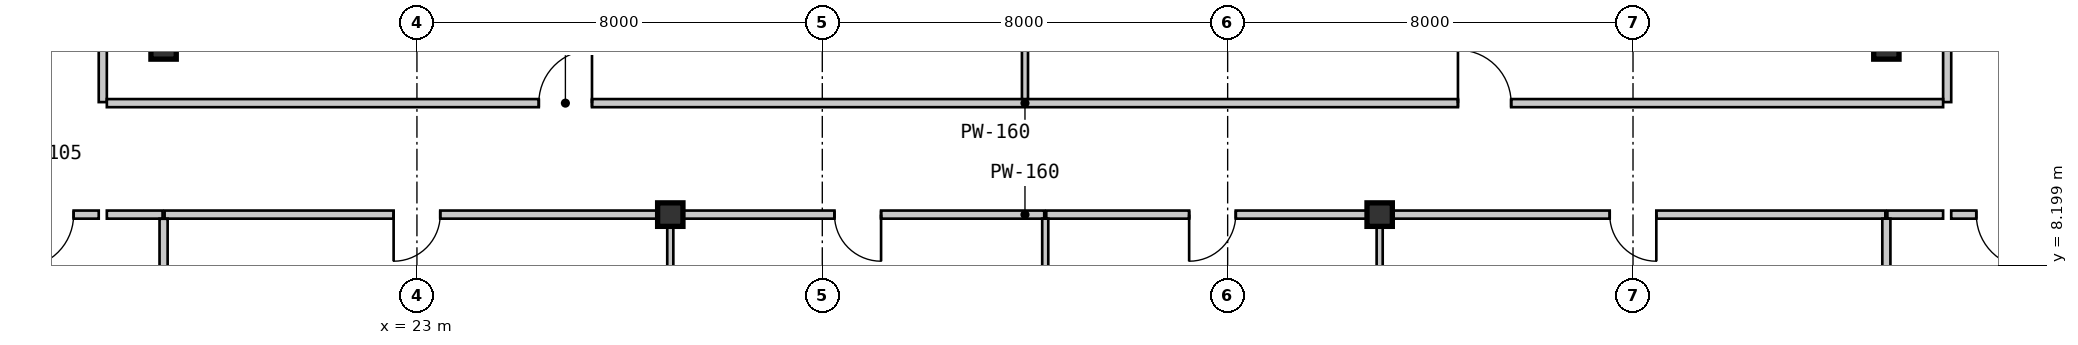
"""IFC4 building model, lengths in metres.
Left out: names, types, materials, properties, quantities, classifications, styles, units other than length and angle.
Written with IfcOpenShell. Run it as: python <this file> out.ifc"""

import sys

from ifc_helpers import new_model, si_unit, direction, frame, frame_2d, origin, origin_2d, place, context, subcontext, project, spatial, rectangle, i_section, extrude, source, transform, mapped, element, fill, save


model = new_model("IFC4")
c1 = context("Model", 3, precision=1e-05, world=origin(), true_north=direction((0.0, 1.0)))
c2 = subcontext(c1, "Body", "Model", "MODEL_VIEW")
j1 = project(units=[si_unit("LENGTHUNIT", "METRE"), si_unit("PLANEANGLEUNIT", "RADIAN")], contexts=[c1])
p1 = place(None, origin())
s1 = spatial("IfcSite", under=j1, at=p1, CompositionType="ELEMENT")
p2 = place(p1, origin())
s2 = spatial("IfcBuilding", under=s1, at=p2, CompositionType="ELEMENT")
p3 = place(p2, frame((0.0, 0.0, 74.55)))
s3 = spatial("IfcBuildingStorey", under=s2, at=p3, CompositionType="ELEMENT", Elevation=74.55)
m1 = source(origin(), c2, "Body", "SweptSolid", [
    extrude(i_section(OverallWidth=0.5, OverallDepth=0.464, WebThickness=0.022, FlangeThickness=0.034, at=origin_2d()), origin(), (0.0, 0.0, 1.0), 3.15),
])
for number, where, z_axis, x_axis in (
    (1, (28.0, 9.2, 0.0), (0.0, 0.0, 1.0), (1.0, 0.0, 0.0)),
    (2, (42.0, 9.2, 0.0), (0.0, 0.0, 1.0), (1.0, 0.0, 0.0)),
    (3, (18.0, 12.5, 0.0), (0.0, 0.0, 1.0), (1.0, 0.0, 0.0)),
    (4, (52.0, 12.5, 0.0), (0.0, 0.0, 1.0), (1.0, 0.0, 0.0)),
):
    element("IfcColumn", number, at=place(p3, frame(where, z_axis=z_axis, x_axis=x_axis)), inside=s3, PredefinedType="COLUMN", context=c2, shape_type="MappedRepresentation", body=[
        mapped(m1, transform((0.0, 0.0, 0.0), scale=1.0)),
    ])
m2 = source(origin(), c2, "Body", "SweptSolid", [
    extrude(rectangle(XDim=5.16, YDim=0.16, at=frame_2d((2.58, 0.0))), origin(), (0.0, 0.0, 1.0), 2.93),
])
for number, where, z_axis, x_axis in (
    (5, (16.8, 16.58, 0.0), (0.0, 0.0, 1.0), (0.0, -1.0, 0.0)),
    (6, (53.2, 11.42, 0.0), (0.0, 0.0, 1.0), (0.0, 1.0, 0.0)),
):
    element("IfcWall", number, at=place(p3, frame(where, z_axis=z_axis, x_axis=x_axis)), inside=s3, PredefinedType="PARTITIONING", context=c2, shape_type="MappedRepresentation", body=[
        mapped(m2, transform((0.0, 0.0, 0.0), scale=1.0)),
    ])
m3 = source(origin(), c2, "Body", "SweptSolid", [
    extrude(rectangle(XDim=2.04, YDim=0.16, at=frame_2d((1.02, 0.0))), origin(), (0.0, 0.0, 1.0), 2.93),
])
p4 = place(p3, frame((16.72, 9.2, 0.0), z_axis=(0.0, 0.0, 1.0), x_axis=(-1.0, 0.0, 0.0)))
e7 = element("IfcWall", 7, at=p4, inside=s3, PredefinedType="PARTITIONING", context=c2, shape_type="MappedRepresentation", body=[
    mapped(m3, transform((0.0, 0.0, 0.0), scale=1.0)),
])
m4 = source(origin(), c2, "Body", "SweptSolid", [
    extrude(rectangle(XDim=1.05, YDim=2.1, at=frame_2d((0.525, 1.05))), frame((0.0, 0.09, 0.0), z_axis=(0.0, -1.0, 0.0), x_axis=(1.0, 0.0, 0.0)), (0.0, 0.0, 1.0), 0.18),
])
p5 = place(p4, frame((0.495, 0.0, 0.0)))
e8 = element("IfcOpeningElement", 8, at=p5, cuts=e7, PredefinedType="OPENING", context=c2, shape_type="MappedRepresentation", body=[
    mapped(m4, transform((0.0, 0.0, 0.0), scale=1.0)),
])
p6 = place(p3, frame((55.32, 9.2, 0.0), z_axis=(0.0, 0.0, 1.0), x_axis=(-1.0, 0.0, 0.0)))
e9 = element("IfcWall", 9, at=p6, inside=s3, PredefinedType="PARTITIONING", context=c2, shape_type="MappedRepresentation", body=[
    mapped(m3, transform((0.0, 0.0, 0.0), scale=1.0)),
])
p7 = place(p6, frame((0.495, 0.0, 0.0)))
e10 = element("IfcOpeningElement", 10, at=p7, cuts=e9, PredefinedType="OPENING", context=c2, shape_type="MappedRepresentation", body=[
    mapped(m4, transform((0.0, 0.0, 0.0), scale=1.0)),
])
m5 = source(origin(), c2, "Body", "SweptSolid", [
    extrude(rectangle(XDim=18.1, YDim=0.16, at=frame_2d((9.05, 0.0))), origin(), (0.0, 0.0, 1.0), 2.93),
])
p8 = place(p3, frame((16.88, 11.4, 0.0), z_axis=(0.0, 0.0, 1.0), x_axis=(1.0, 0.0, 0.0)))
e11 = element("IfcWall", 11, at=p8, inside=s3, PredefinedType="PARTITIONING", context=c2, shape_type="MappedRepresentation", body=[
    mapped(m5, transform((0.0, 0.0, 0.0), scale=1.0)),
])
p9 = place(p8, frame((8.525, 0.0, 0.0)))
e12 = element("IfcOpeningElement", 12, at=p9, cuts=e11, PredefinedType="OPENING", context=c2, shape_type="MappedRepresentation", body=[
    mapped(m4, transform((0.0, 0.0, 0.0), scale=1.0)),
])
p10 = place(p3, frame((35.02, 11.4, 0.0), z_axis=(0.0, 0.0, 1.0), x_axis=(1.0, 0.0, 0.0)))
e13 = element("IfcWall", 13, at=p10, inside=s3, PredefinedType="PARTITIONING", context=c2, shape_type="MappedRepresentation", body=[
    mapped(m5, transform((0.0, 0.0, 0.0), scale=1.0)),
])
p11 = place(p10, frame((8.525, 0.0, 0.0)))
e14 = element("IfcOpeningElement", 14, at=p11, cuts=e13, PredefinedType="OPENING", context=c2, shape_type="MappedRepresentation", body=[
    mapped(m4, transform((0.0, 0.0, 0.0), scale=1.0)),
])
m6 = source(origin(), c2, "Body", "SweptSolid", [
    extrude(rectangle(XDim=1.1, YDim=0.16, at=frame_2d((0.55, 0.0))), origin(), (0.0, 0.0, 1.0), 2.93),
])
p12 = place(p3, frame((17.98, 9.2, 0.0), z_axis=(0.0, 0.0, 1.0), x_axis=(-1.0, 0.0, 0.0)))
e15 = element("IfcWall", 15, at=p12, inside=s3, PredefinedType="PARTITIONING", context=c2, shape_type="MappedRepresentation", body=[
    mapped(m6, transform((0.0, 0.0, 0.0), scale=1.0)),
])
m7 = source(origin(), c2, "Body", "SweptSolid", [
    extrude(rectangle(XDim=9.959, YDim=0.16, at=frame_2d((4.98, 0.0))), origin(), (0.0, 0.0, 1.0), 2.93),
])
p13 = place(p3, frame((27.98, 9.2, 0.0), z_axis=(0.0, 0.0, 1.0), x_axis=(-1.0, 0.0, 0.0)))
e16 = element("IfcWall", 16, at=p13, inside=s3, PredefinedType="PARTITIONING", context=c2, shape_type="MappedRepresentation", body=[
    mapped(m7, transform((0.0, 0.0, 0.0), scale=1.0)),
])
m8 = source(origin(), c2, "Body", "SweptSolid", [
    extrude(rectangle(XDim=0.92, YDim=2.1, at=frame_2d((0.46, 1.05))), frame((0.0, 0.09, 0.0), z_axis=(0.0, -1.0, 0.0), x_axis=(1.0, 0.0, 0.0)), (0.0, 0.0, 1.0), 0.18),
])
p14 = place(p13, frame((4.52, 0.0, 0.0)))
e17 = element("IfcOpeningElement", 17, at=p14, cuts=e16, PredefinedType="OPENING", context=c2, shape_type="MappedRepresentation", body=[
    mapped(m8, transform((0.0, 0.0, 0.0), scale=1.0)),
])
m9 = source(origin(), c2, "Body", "SweptSolid", [
    extrude(rectangle(XDim=7.36, YDim=0.16, at=frame_2d((3.68, 0.0))), origin(), (0.0, 0.0, 1.0), 2.328),
])
p15 = place(p3, frame((35.38, 9.2, 0.0), z_axis=(0.0, 0.0, 1.0), x_axis=(-1.0, 0.0, 0.0)))
e18 = element("IfcWall", 18, at=p15, inside=s3, PredefinedType="PARTITIONING", context=c2, shape_type="MappedRepresentation", body=[
    mapped(m9, transform((0.0, 0.0, 0.0), scale=1.0)),
])
p16 = place(p15, frame((3.22, 0.0, 0.0)))
e19 = element("IfcOpeningElement", 19, at=p16, cuts=e18, PredefinedType="OPENING", context=c2, shape_type="MappedRepresentation", body=[
    mapped(m8, transform((0.0, 0.0, 0.0), scale=1.0)),
])
m10 = source(origin(), c2, "Body", "SweptSolid", [
    extrude(rectangle(XDim=6.56, YDim=0.16, at=frame_2d((3.28, 0.0))), origin(), (0.0, 0.0, 1.0), 2.328),
])
p17 = place(p3, frame((41.98, 9.2, 0.0), z_axis=(0.0, 0.0, 1.0), x_axis=(-1.0, 0.0, 0.0)))
e20 = element("IfcWall", 20, at=p17, inside=s3, PredefinedType="PARTITIONING", context=c2, shape_type="MappedRepresentation", body=[
    mapped(m10, transform((0.0, 0.0, 0.0), scale=1.0)),
])
p18 = place(p17, frame((2.82, 0.0, 0.0)))
e21 = element("IfcOpeningElement", 21, at=p18, cuts=e20, PredefinedType="OPENING", context=c2, shape_type="MappedRepresentation", body=[
    mapped(m8, transform((0.0, 0.0, 0.0), scale=1.0)),
])
p19 = place(p3, frame((51.98, 9.2, 0.0), z_axis=(0.0, 0.0, 1.0), x_axis=(-1.0, 0.0, 0.0)))
e22 = element("IfcWall", 22, at=p19, inside=s3, PredefinedType="PARTITIONING", context=c2, shape_type="MappedRepresentation", body=[
    mapped(m7, transform((0.0, 0.0, 0.0), scale=1.0)),
])
p20 = place(p19, frame((4.52, 0.0, 0.0)))
e23 = element("IfcOpeningElement", 23, at=p20, cuts=e22, PredefinedType="OPENING", context=c2, shape_type="MappedRepresentation", body=[
    mapped(m8, transform((0.0, 0.0, 0.0), scale=1.0)),
])
p21 = place(p3, frame((53.12, 9.2, 0.0), z_axis=(0.0, 0.0, 1.0), x_axis=(-1.0, 0.0, 0.0)))
e24 = element("IfcWall", 24, at=p21, inside=s3, PredefinedType="PARTITIONING", context=c2, shape_type="MappedRepresentation", body=[
    mapped(m6, transform((0.0, 0.0, 0.0), scale=1.0)),
])
m11 = source(origin(), c2, "Body", "SweptSolid", [
    extrude(rectangle(XDim=5.04, YDim=0.12, at=frame_2d((2.52, 0.0))), origin(), (0.0, 0.0, 1.0), 2.93),
])
p22 = place(p3, frame((35.0, 16.52, 0.0), z_axis=(0.0, 0.0, 1.0), x_axis=(0.0, -1.0, 0.0)))
e25 = element("IfcWall", 25, at=p22, inside=s3, PredefinedType="PARTITIONING", context=c2, shape_type="MappedRepresentation", body=[
    mapped(m11, transform((0.0, 0.0, 0.0), scale=1.0)),
])
m12 = source(origin(), c2, "Body", "SweptSolid", [
    extrude(rectangle(XDim=9.325, YDim=0.16, at=frame_2d((4.663, 0.0))), origin(), (0.0, 0.0, 1.0), 2.93),
])
p23 = place(p3, frame((18.0, 9.118, 0.0), z_axis=(0.0, 0.0, 1.0), x_axis=(0.0, -1.0, 0.0)))
e26 = element("IfcWall", 26, at=p23, inside=s3, PredefinedType="PARTITIONING", context=c2, shape_type="MappedRepresentation", body=[
    mapped(m12, transform((0.0, 0.0, 0.0), scale=1.0)),
])
m13 = source(origin(), c2, "Body", "SweptSolid", [
    extrude(rectangle(XDim=8.349, YDim=0.12, at=frame_2d((4.174, 0.0))), origin(), (0.0, 0.0, 1.0), 2.93),
])
p24 = place(p3, frame((28.0, 9.12, 0.0), z_axis=(0.0, 0.0, 1.0), x_axis=(0.0, -1.0, 0.0)))
e27 = element("IfcWall", 27, at=p24, inside=s3, PredefinedType="PARTITIONING", context=c2, shape_type="MappedRepresentation", body=[
    mapped(m13, transform((0.0, 0.0, 0.0), scale=1.0)),
])
m14 = source(origin(), c2, "Body", "SweptSolid", [
    extrude(rectangle(XDim=7.623, YDim=0.12, at=frame_2d((3.812, 0.0))), origin(), (0.0, 0.0, 1.0), 2.93),
])
p25 = place(p3, frame((35.4, 9.12, 0.0), z_axis=(0.0, 0.0, 1.0), x_axis=(0.0, -1.0, 0.0)))
e28 = element("IfcWall", 28, at=p25, inside=s3, PredefinedType="PARTITIONING", context=c2, shape_type="MappedRepresentation", body=[
    mapped(m14, transform((0.0, 0.0, 0.0), scale=1.0)),
])
m15 = source(origin(), c2, "Body", "SweptSolid", [
    extrude(rectangle(XDim=6.976, YDim=0.12, at=frame_2d((3.488, 0.0))), origin(), (0.0, 0.0, 1.0), 2.93),
])
p26 = place(p3, frame((42.0, 9.12, 0.0), z_axis=(0.0, 0.0, 1.0), x_axis=(0.0, -1.0, 0.0)))
e29 = element("IfcWall", 29, at=p26, inside=s3, PredefinedType="PARTITIONING", context=c2, shape_type="MappedRepresentation", body=[
    mapped(m15, transform((0.0, 0.0, 0.0), scale=1.0)),
])
m16 = source(origin(), c2, "Body", "SweptSolid", [
    extrude(rectangle(XDim=3.59, YDim=0.16, at=frame_2d((1.795, 0.0))), origin(), (0.0, 0.0, 1.0), 2.93),
])
p27 = place(p3, frame((52.0, 9.12, 0.0), z_axis=(0.0, 0.0, 1.0), x_axis=(0.0, -1.0, 0.0)))
e30 = element("IfcWall", 30, at=p27, inside=s3, PredefinedType="PARTITIONING", context=c2, shape_type="MappedRepresentation", body=[
    mapped(m16, transform((0.0, 0.0, 0.0), scale=1.0)),
])
m17 = source(origin(), c2, "Body", "SweptSolid", [
    extrude(rectangle(XDim=1.05, YDim=2.1, at=frame_2d((0.525, 1.05))), frame((0.0, 0.025, 0.0), z_axis=(0.0, -1.0, 0.0), x_axis=(1.0, 0.0, 0.0)), (0.0, 0.0, 1.0), 0.05),
])
p28 = place(p5, origin())
e31 = element("IfcDoor", 31, at=p28, inside=s3, OperationType="SINGLE_SWING_RIGHT", PredefinedType="DOOR", context=c2, shape_type="MappedRepresentation", body=[
    mapped(m17, transform((0.0, 0.0, 0.0), scale=1.0)),
])
fill(e8, e31)
p29 = place(p7, origin())
e32 = element("IfcDoor", 32, at=p29, inside=s3, OperationType="SINGLE_SWING_LEFT", PredefinedType="DOOR", context=c2, shape_type="MappedRepresentation", body=[
    mapped(m17, transform((0.0, 0.0, 0.0), scale=1.0)),
])
fill(e10, e32)
p30 = place(p9, origin())
e33 = element("IfcDoor", 33, at=p30, inside=s3, OperationType="SINGLE_SWING_RIGHT", PredefinedType="DOOR", context=c2, shape_type="MappedRepresentation", body=[
    mapped(m17, transform((0.0, 0.0, 0.0), scale=1.0)),
])
fill(e12, e33)
p31 = place(p11, origin())
e34 = element("IfcDoor", 34, at=p31, inside=s3, OperationType="SINGLE_SWING_LEFT", PredefinedType="DOOR", context=c2, shape_type="MappedRepresentation", body=[
    mapped(m17, transform((0.0, 0.0, 0.0), scale=1.0)),
])
fill(e14, e34)
m18 = source(origin(), c2, "Body", "SweptSolid", [
    extrude(rectangle(XDim=0.92, YDim=2.1, at=frame_2d((0.46, 1.05))), frame((0.0, 0.025, 0.0), z_axis=(0.0, -1.0, 0.0), x_axis=(1.0, 0.0, 0.0)), (0.0, 0.0, 1.0), 0.05),
])
p32 = place(p14, origin())
e35 = element("IfcDoor", 35, at=p32, inside=s3, OperationType="SINGLE_SWING_RIGHT", PredefinedType="DOOR", context=c2, shape_type="MappedRepresentation", body=[
    mapped(m18, transform((0.0, 0.0, 0.0), scale=1.0)),
])
fill(e17, e35)
p33 = place(p16, origin())
e36 = element("IfcDoor", 36, at=p33, inside=s3, OperationType="SINGLE_SWING_LEFT", PredefinedType="DOOR", context=c2, shape_type="MappedRepresentation", body=[
    mapped(m18, transform((0.0, 0.0, 0.0), scale=1.0)),
])
fill(e19, e36)
p34 = place(p18, origin())
e37 = element("IfcDoor", 37, at=p34, inside=s3, OperationType="SINGLE_SWING_RIGHT", PredefinedType="DOOR", context=c2, shape_type="MappedRepresentation", body=[
    mapped(m18, transform((0.0, 0.0, 0.0), scale=1.0)),
])
fill(e21, e37)
p35 = place(p20, origin())
e38 = element("IfcDoor", 38, at=p35, inside=s3, OperationType="SINGLE_SWING_LEFT", PredefinedType="DOOR", context=c2, shape_type="MappedRepresentation", body=[
    mapped(m18, transform((0.0, 0.0, 0.0), scale=1.0)),
])
fill(e23, e38)
save(model, sys.argv[1])
